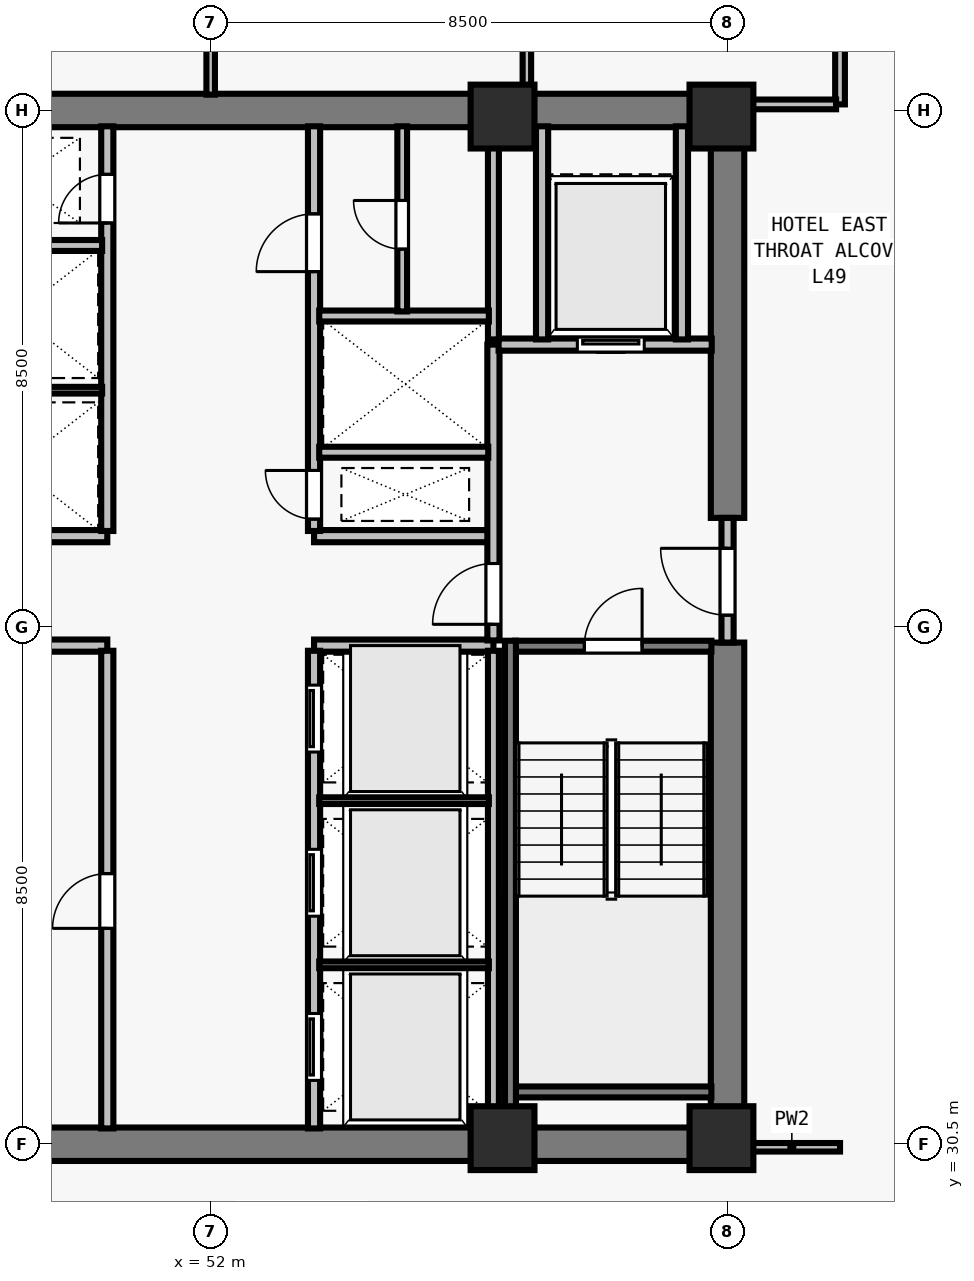
"""IFC4 building model, lengths in metres.
Left out: names, types, materials, properties, quantities, classifications, styles, units other than length and angle.
Written with IfcOpenShell. Run it as: python <this file> out.ifc"""

import sys

from ifc_helpers import new_model, si_unit, direction, frame, frame_2d, origin, origin_2d, place, context, subcontext, project, spatial, rectangle, extrude, element, fill, save


model = new_model("IFC4")
c1 = context("Model", 3, precision=1e-05, world=origin(), true_north=direction((0.0, 1.0)))
c2 = subcontext(c1, "Body", "Model", "MODEL_VIEW")
j1 = project(units=[si_unit("LENGTHUNIT", "METRE"), si_unit("PLANEANGLEUNIT", "RADIAN")], contexts=[c1])
p1 = place(None, origin())
s1 = spatial("IfcSite", under=j1, at=p1, CompositionType="ELEMENT")
p2 = place(p1, origin())
s2 = spatial("IfcBuilding", under=s1, at=p2, CompositionType="ELEMENT")
p3 = place(p2, frame((0.0, 0.0, 179.5)))
s3 = spatial("IfcBuildingStorey", under=s2, at=p3, CompositionType="ELEMENT", Elevation=179.5)
for number, where, z_axis, x_axis in (
    (1, (56.8, 30.6, 0.0), (0.0, 0.0, 1.0), (1.0, 0.0, 0.0)),
    (2, (60.4, 30.6, 0.0), (0.0, 0.0, 1.0), (1.0, 0.0, 0.0)),
    (3, (56.8, 47.4, 0.0), (0.0, 0.0, 1.0), (1.0, 0.0, 0.0)),
    (4, (60.4, 47.4, 0.0), (0.0, 0.0, 1.0), (1.0, 0.0, 0.0)),
):
    element("IfcColumn", number, at=place(p3, frame(where, z_axis=z_axis, x_axis=x_axis)), inside=s3, PredefinedType="COLUMN", context=c2, shape_type="SweptSolid", body=[
        extrude(rectangle(XDim=1.05, YDim=1.05, at=origin_2d()), origin(), (0.0, 0.0, 1.0), 3.5),
    ])
for number, where, z_axis, x_axis in (
    (5, (43.225, 30.5, 0.0), (0.0, 0.0, 1.0), (1.0, 0.0, 0.0)),
    (6, (43.225, 47.5, 0.0), (0.0, 0.0, 1.0), (1.0, 0.0, 0.0)),
):
    element("IfcWall", number, at=place(p3, frame(where, z_axis=z_axis, x_axis=x_axis)), inside=s3, PredefinedType="SHEAR", context=c2, shape_type="SweptSolid", body=[
        extrude(rectangle(XDim=17.55, YDim=0.55, at=frame_2d((8.775, 0.0))), origin(), (0.0, 0.0, 1.0), 3.28),
    ])
p4 = place(p3, frame((60.5, 30.765, 0.0), z_axis=(0.0, 0.0, 1.0), x_axis=(0.0, 1.0, 0.0)))
e7 = element("IfcWall", 7, at=p4, inside=s3, PredefinedType="SHEAR", context=c2, shape_type="SweptSolid", body=[
    extrude(rectangle(XDim=7.985, YDim=0.55, at=frame_2d((3.993, 0.0))), origin(), (0.0, 0.0, 1.0), 3.28),
])
p5 = place(p3, frame((60.5, 40.8, 0.0), z_axis=(0.0, 0.0, 1.0), x_axis=(0.0, 1.0, 0.0)))
e8 = element("IfcWall", 8, at=p5, inside=s3, PredefinedType="SHEAR", context=c2, shape_type="SweptSolid", body=[
    extrude(rectangle(XDim=6.435, YDim=0.55, at=frame_2d((3.218, 0.0))), origin(), (0.0, 0.0, 1.0), 3.28),
])
for number, where, z_axis, x_axis in (
    (9, (47.35, 38.7, 0.0), (0.0, 0.0, 1.0), (1.0, 0.0, 0.0)),
    (10, (47.35, 40.5, 0.0), (0.0, 0.0, 1.0), (1.0, 0.0, 0.0)),
    (11, (53.7, 38.7, 0.0), (0.0, 0.0, 1.0), (1.0, 0.0, 0.0)),
    (12, (53.7, 40.5, 0.0), (0.0, 0.0, 1.0), (1.0, 0.0, 0.0)),
):
    element("IfcWall", number, at=place(p3, frame(where, z_axis=z_axis, x_axis=x_axis)), inside=s3, PredefinedType="SOLIDWALL", context=c2, shape_type="SweptSolid", body=[
        extrude(rectangle(XDim=2.95, YDim=0.2, at=frame_2d((1.475, 0.0))), origin(), (0.0, 0.0, 1.0), 3.28),
    ])
p6 = place(p3, frame((50.3, 30.76, 0.0), z_axis=(0.0, 0.0, 1.0), x_axis=(0.0, 1.0, 0.0)))
e13 = element("IfcWall", 13, at=p6, inside=s3, PredefinedType="SOLIDWALL", context=c2, shape_type="SweptSolid", body=[
    extrude(rectangle(XDim=7.855, YDim=0.2, at=frame_2d((3.927, 0.0))), origin(), (0.0, 0.0, 1.0), 3.28),
])
p7 = place(p6, frame((3.29, 0.0, 0.0)))
e14 = element("IfcOpeningElement", 14, at=p7, cuts=e13, PredefinedType="OPENING", context=c2, shape_type="SweptSolid", body=[
    extrude(rectangle(XDim=0.9, YDim=2.12, at=frame_2d((0.45, 1.06))), frame((0.0, 0.11, 0.0), z_axis=(0.0, -1.0, 0.0), x_axis=(1.0, 0.0, 0.0)), (0.0, 0.0, 1.0), 0.22),
])
p8 = place(p3, frame((53.7, 30.76, 0.0), z_axis=(0.0, 0.0, 1.0), x_axis=(0.0, 1.0, 0.0)))
e15 = element("IfcWall", 15, at=p8, inside=s3, PredefinedType="SOLIDWALL", context=c2, shape_type="SweptSolid", body=[
    extrude(rectangle(XDim=7.855, YDim=0.2, at=frame_2d((3.927, 0.0))), origin(), (0.0, 0.0, 1.0), 3.28),
])
p9 = place(p8, frame((0.79, 0.0, 0.0)))
e16 = element("IfcOpeningElement", 16, at=p9, cuts=e15, PredefinedType="OPENING", context=c2, shape_type="SweptSolid", body=[
    extrude(rectangle(XDim=1.1, YDim=2.2, at=frame_2d((0.55, 1.1))), frame((0.0, 0.11, 0.0), z_axis=(0.0, -1.0, 0.0), x_axis=(1.0, 0.0, 0.0)), (0.0, 0.0, 1.0), 0.22),
])
p10 = place(p8, frame((3.49, 0.0, 0.0)))
e17 = element("IfcOpeningElement", 17, at=p10, cuts=e15, PredefinedType="OPENING", context=c2, shape_type="SweptSolid", body=[
    extrude(rectangle(XDim=1.1, YDim=2.2, at=frame_2d((0.55, 1.1))), frame((0.0, 0.11, 0.0), z_axis=(0.0, -1.0, 0.0), x_axis=(1.0, 0.0, 0.0)), (0.0, 0.0, 1.0), 0.22),
])
p11 = place(p8, frame((6.19, 0.0, 0.0)))
e18 = element("IfcOpeningElement", 18, at=p11, cuts=e15, PredefinedType="OPENING", context=c2, shape_type="SweptSolid", body=[
    extrude(rectangle(XDim=1.1, YDim=2.2, at=frame_2d((0.55, 1.1))), frame((0.0, 0.11, 0.0), z_axis=(0.0, -1.0, 0.0), x_axis=(1.0, 0.0, 0.0)), (0.0, 0.0, 1.0), 0.22),
])
p12 = place(p3, frame((50.3, 40.585, 0.0), z_axis=(0.0, 0.0, 1.0), x_axis=(0.0, 1.0, 0.0)))
e19 = element("IfcWall", 19, at=p12, inside=s3, PredefinedType="SOLIDWALL", context=c2, shape_type="SweptSolid", body=[
    extrude(rectangle(XDim=6.655, YDim=0.2, at=frame_2d((3.328, 0.0))), origin(), (0.0, 0.0, 1.0), 3.28),
])
p13 = place(p12, frame((5.065, 0.0, 0.0)))
e20 = element("IfcOpeningElement", 20, at=p13, cuts=e19, PredefinedType="OPENING", context=c2, shape_type="SweptSolid", body=[
    extrude(rectangle(XDim=0.8, YDim=2.08, at=frame_2d((0.4, 1.04))), frame((0.0, 0.11, 0.0), z_axis=(0.0, -1.0, 0.0), x_axis=(1.0, 0.0, 0.0)), (0.0, 0.0, 1.0), 0.22),
])
p14 = place(p3, frame((53.7, 40.585, 0.0), z_axis=(0.0, 0.0, 1.0), x_axis=(0.0, 1.0, 0.0)))
e21 = element("IfcWall", 21, at=p14, inside=s3, PredefinedType="SOLIDWALL", context=c2, shape_type="SweptSolid", body=[
    extrude(rectangle(XDim=6.655, YDim=0.2, at=frame_2d((3.328, 0.0))), origin(), (0.0, 0.0, 1.0), 3.28),
])
p15 = place(p14, frame((0.195, 0.0, 0.0)))
e22 = element("IfcOpeningElement", 22, at=p15, cuts=e21, PredefinedType="OPENING", context=c2, shape_type="SweptSolid", body=[
    extrude(rectangle(XDim=0.8, YDim=2.08, at=frame_2d((0.4, 1.04))), frame((0.0, 0.11, 0.0), z_axis=(0.0, -1.0, 0.0), x_axis=(1.0, 0.0, 0.0)), (0.0, 0.0, 1.0), 0.22),
])
p16 = place(p14, frame((4.265, 0.0, 0.0)))
e23 = element("IfcOpeningElement", 23, at=p16, cuts=e21, PredefinedType="OPENING", context=c2, shape_type="SweptSolid", body=[
    extrude(rectangle(XDim=0.95, YDim=2.12, at=frame_2d((0.475, 1.06))), frame((0.0, 0.11, 0.0), z_axis=(0.0, -1.0, 0.0), x_axis=(1.0, 0.0, 0.0)), (0.0, 0.0, 1.0), 0.22),
])
p17 = place(p3, frame((60.5, 38.75, 0.0), z_axis=(0.0, 0.0, 1.0), x_axis=(0.0, 1.0, 0.0)))
e24 = element("IfcWall", 24, at=p17, inside=s3, PredefinedType="SOLIDWALL", context=c2, shape_type="SweptSolid", body=[
    extrude(rectangle(XDim=2.05, YDim=0.2, at=frame_2d((1.025, 0.0))), origin(), (0.0, 0.0, 1.0), 3.28),
])
p18 = place(p17, frame((0.45, 0.0, 0.0)))
e25 = element("IfcOpeningElement", 25, at=p18, cuts=e24, PredefinedType="OPENING", context=c2, shape_type="SweptSolid", body=[
    extrude(rectangle(XDim=1.1, YDim=2.15, at=frame_2d((0.55, 1.075))), frame((0.0, 0.11, 0.0), z_axis=(0.0, -1.0, 0.0), x_axis=(1.0, 0.0, 0.0)), (0.0, 0.0, 1.0), 0.22),
])
p19 = place(p3, frame((56.65, 38.785, 0.0), z_axis=(0.0, 0.0, 1.0), x_axis=(0.0, 1.0, 0.0)))
e26 = element("IfcWall", 26, at=p19, inside=s3, PredefinedType="SOLIDWALL", context=c2, shape_type="SweptSolid", body=[
    extrude(rectangle(XDim=4.865, YDim=0.2, at=frame_2d((2.433, 0.0))), origin(), (0.0, 0.0, 1.0), 3.28),
])
p20 = place(p19, frame((0.265, 0.0, 0.0)))
e27 = element("IfcOpeningElement", 27, at=p20, cuts=e26, PredefinedType="OPENING", context=c2, shape_type="SweptSolid", body=[
    extrude(rectangle(XDim=1.0, YDim=2.15, at=frame_2d((0.5, 1.075))), frame((0.0, 0.11, 0.0), z_axis=(0.0, -1.0, 0.0), x_axis=(1.0, 0.0, 0.0)), (0.0, 0.0, 1.0), 0.22),
])
p21 = place(p3, frame((56.735, 43.65, 0.0), z_axis=(0.0, 0.0, 1.0), x_axis=(1.0, 0.0, 0.0)))
e28 = element("IfcWall", 28, at=p21, inside=s3, PredefinedType="SOLIDWALL", context=c2, shape_type="SweptSolid", body=[
    extrude(rectangle(XDim=3.505, YDim=0.2, at=frame_2d((1.752, 0.0))), origin(), (0.0, 0.0, 1.0), 3.28),
])
p22 = place(p21, frame((1.295, 0.0, 0.0)))
e29 = element("IfcOpeningElement", 29, at=p22, cuts=e28, PredefinedType="OPENING", context=c2, shape_type="SweptSolid", body=[
    extrude(rectangle(XDim=1.1, YDim=2.2, at=frame_2d((0.55, 1.1))), frame((0.0, 0.11, 0.0), z_axis=(0.0, -1.0, 0.0), x_axis=(1.0, 0.0, 0.0)), (0.0, 0.0, 1.0), 0.22),
])
for number, where, z_axis, x_axis in (
    (30, (57.45, 43.735, 0.0), (0.0, 0.0, 1.0), (0.0, 1.0, 0.0)),
    (31, (59.75, 43.735, 0.0), (0.0, 0.0, 1.0), (0.0, 1.0, 0.0)),
):
    element("IfcWall", number, at=place(p3, frame(where, z_axis=z_axis, x_axis=x_axis)), inside=s3, PredefinedType="SOLIDWALL", context=c2, shape_type="SweptSolid", body=[
        extrude(rectangle(XDim=3.505, YDim=0.2, at=frame_2d((1.752, 0.0))), origin(), (0.0, 0.0, 1.0), 3.28),
    ])
p23 = place(p3, frame((56.65, 30.76, 0.0), z_axis=(0.0, 0.0, 1.0), x_axis=(0.0, 1.0, 0.0)))
e32 = element("IfcWall", 32, at=p23, inside=s3, PredefinedType="SOLIDWALL", context=c2, shape_type="SweptSolid", body=[
    extrude(rectangle(XDim=7.855, YDim=0.18, at=frame_2d((3.927, 0.0))), origin(), (0.0, 0.0, 1.0), 3.28),
])
for number, where, z_axis, x_axis in (
    (33, (53.785, 33.45, 0.0), (0.0, 0.0, 1.0), (1.0, 0.0, 0.0)),
    (34, (53.785, 36.15, 0.0), (0.0, 0.0, 1.0), (1.0, 0.0, 0.0)),
):
    element("IfcWall", number, at=place(p3, frame(where, z_axis=z_axis, x_axis=x_axis)), inside=s3, PredefinedType="PARTITIONING", context=c2, shape_type="SweptSolid", body=[
        extrude(rectangle(XDim=2.79, YDim=0.11, at=frame_2d((1.395, 0.0))), origin(), (0.0, 0.0, 1.0), 3.28),
    ])
p24 = place(p3, frame((47.435, 42.9, 0.0), z_axis=(0.0, 0.0, 1.0), x_axis=(1.0, 0.0, 0.0)))
e35 = element("IfcWall", 35, at=p24, inside=s3, PredefinedType="PARTITIONING", context=c2, shape_type="SweptSolid", body=[
    extrude(rectangle(XDim=2.78, YDim=0.11, at=frame_2d((1.39, 0.0))), origin(), (0.0, 0.0, 1.0), 3.28),
])
p25 = place(p3, frame((47.425, 45.28, 0.0), z_axis=(0.0, 0.0, 1.0), x_axis=(1.0, 0.0, 0.0)))
e36 = element("IfcWall", 36, at=p25, inside=s3, PredefinedType="SOLIDWALL", context=c2, shape_type="SweptSolid", body=[
    extrude(rectangle(XDim=2.79, YDim=0.18, at=frame_2d((1.395, 0.0))), origin(), (0.0, 0.0, 1.0), 3.28),
])
p26 = place(p3, frame((56.65, 43.735, 0.0), z_axis=(0.0, 0.0, 1.0), x_axis=(0.0, 1.0, 0.0)))
e37 = element("IfcWall", 37, at=p26, inside=s3, PredefinedType="SOLIDWALL", context=c2, shape_type="SweptSolid", body=[
    extrude(rectangle(XDim=3.505, YDim=0.18, at=frame_2d((1.752, 0.0))), origin(), (0.0, 0.0, 1.0), 3.28),
])
p27 = place(p3, frame((53.785, 41.88, 0.0), z_axis=(0.0, 0.0, 1.0), x_axis=(1.0, 0.0, 0.0)))
e38 = element("IfcWall", 38, at=p27, inside=s3, PredefinedType="SOLIDWALL", context=c2, shape_type="SweptSolid", body=[
    extrude(rectangle(XDim=2.78, YDim=0.18, at=frame_2d((1.39, 0.0))), origin(), (0.0, 0.0, 1.0), 3.28),
])
p28 = place(p3, frame((53.785, 44.12, 0.0), z_axis=(0.0, 0.0, 1.0), x_axis=(1.0, 0.0, 0.0)))
e39 = element("IfcWall", 39, at=p28, inside=s3, PredefinedType="SOLIDWALL", context=c2, shape_type="SweptSolid", body=[
    extrude(rectangle(XDim=2.79, YDim=0.18, at=frame_2d((1.395, 0.0))), origin(), (0.0, 0.0, 1.0), 3.28),
])
p29 = place(p3, frame((55.15, 44.195, 0.0), z_axis=(0.0, 0.0, 1.0), x_axis=(0.0, 1.0, 0.0)))
e40 = element("IfcWall", 40, at=p29, inside=s3, PredefinedType="PARTITIONING", context=c2, shape_type="SweptSolid", body=[
    extrude(rectangle(XDim=3.045, YDim=0.16, at=frame_2d((1.522, 0.0))), origin(), (0.0, 0.0, 1.0), 3.28),
])
p30 = place(p29, frame((1.025, 0.0, 0.0)))
e41 = element("IfcOpeningElement", 41, at=p30, cuts=e40, PredefinedType="OPENING", context=c2, shape_type="SweptSolid", body=[
    extrude(rectangle(XDim=0.8, YDim=2.1, at=frame_2d((0.4, 1.05))), frame((0.0, 0.09, 0.0), z_axis=(0.0, -1.0, 0.0), x_axis=(1.0, 0.0, 0.0)), (0.0, 0.0, 1.0), 0.18),
])
p31 = place(p3, frame((62.35, 47.6, 0.0), z_axis=(0.0, 0.0, 1.0), x_axis=(0.0, 1.0, 0.0)))
e42 = element("IfcWall", 42, at=p31, inside=s3, PredefinedType="PARTITIONING", context=c2, shape_type="SweptSolid", body=[
    extrude(rectangle(XDim=15.075, YDim=0.16, at=frame_2d((7.538, 0.0))), origin(), (0.0, 0.0, 1.0), 2.555),
])
p32 = place(p31, frame((3.2, 0.0, 0.0)))
e43 = element("IfcOpeningElement", 43, at=p32, cuts=e42, PredefinedType="OPENING", context=c2, shape_type="SweptSolid", body=[
    extrude(rectangle(XDim=0.92, YDim=2.12, at=frame_2d((0.46, 1.06))), frame((0.0, 0.09, 0.0), z_axis=(0.0, -1.0, 0.0), x_axis=(1.0, 0.0, 0.0)), (0.0, 0.0, 1.0), 0.18),
])
p33 = place(p3, frame((60.765, 30.45, 0.0), z_axis=(0.0, 0.0, 1.0), x_axis=(1.0, 0.0, 0.0)))
e44 = element("IfcWall", 44, at=p33, inside=s3, PredefinedType="PARTITIONING", context=c2, shape_type="SweptSolid", body=[
    extrude(rectangle(XDim=1.585, YDim=0.14, at=frame_2d((0.792, 0.0))), origin(), (0.0, 0.0, 1.0), 3.28),
])
p34 = place(p3, frame((60.765, 47.6, 0.0), z_axis=(0.0, 0.0, 1.0), x_axis=(1.0, 0.0, 0.0)))
e45 = element("IfcWall", 45, at=p34, inside=s3, PredefinedType="PARTITIONING", context=c2, shape_type="SweptSolid", body=[
    extrude(rectangle(XDim=1.52, YDim=0.16, at=frame_2d((0.76, 0.0))), origin(), (0.0, 0.0, 1.0), 3.28),
])
p35 = place(p3, frame((52.0, 47.76, 0.0), z_axis=(0.0, 0.0, 1.0), x_axis=(0.0, 1.0, 0.0)))
e46 = element("IfcWall", 46, at=p35, inside=s3, PredefinedType="PARTITIONING", context=c2, shape_type="SweptSolid", body=[
    extrude(rectangle(XDim=14.915, YDim=0.14, at=frame_2d((7.458, 0.0))), origin(), (0.0, 0.0, 1.0), 2.896),
])
p36 = place(p35, frame((2.34, 0.0, 0.0)))
e47 = element("IfcOpeningElement", 47, at=p36, cuts=e46, PredefinedType="OPENING", context=c2, shape_type="SweptSolid", body=[
    extrude(rectangle(XDim=0.92, YDim=2.12, at=frame_2d((0.46, 1.06))), frame((0.0, 0.08, 0.0), z_axis=(0.0, -1.0, 0.0), x_axis=(1.0, 0.0, 0.0)), (0.0, 0.0, 1.0), 0.16),
])
p37 = place(p3, frame((57.2, 47.76, 0.0), z_axis=(0.0, 0.0, 1.0), x_axis=(0.0, 1.0, 0.0)))
e48 = element("IfcWall", 48, at=p37, inside=s3, PredefinedType="PARTITIONING", context=c2, shape_type="SweptSolid", body=[
    extrude(rectangle(XDim=14.915, YDim=0.14, at=frame_2d((7.458, 0.0))), origin(), (0.0, 0.0, 1.0), 3.28),
])
p38 = place(p3, frame((57.005, 38.69, 0.0), z_axis=(0.0, 0.0, 1.0), x_axis=(1.0, 0.0, 0.0)))
e49 = element("IfcWall", 49, at=p38, inside=s3, PredefinedType="SOLIDWALL", context=c2, shape_type="SweptSolid", body=[
    extrude(rectangle(XDim=3.23, YDim=0.18, at=frame_2d((1.615, 0.0))), origin(), (0.0, 0.0, 1.0), 3.28),
])
p39 = place(p38, frame((1.14, 0.0, 0.0)))
e50 = element("IfcOpeningElement", 50, at=p39, cuts=e49, PredefinedType="OPENING", context=c2, shape_type="SweptSolid", body=[
    extrude(rectangle(XDim=0.95, YDim=2.15, at=frame_2d((0.475, 1.075))), frame((0.0, 0.1, 0.0), z_axis=(0.0, -1.0, 0.0), x_axis=(1.0, 0.0, 0.0)), (0.0, 0.0, 1.0), 0.2),
])
p40 = place(p3, frame((57.005, 31.36, 0.0), z_axis=(0.0, 0.0, 1.0), x_axis=(1.0, 0.0, 0.0)))
e51 = element("IfcWall", 51, at=p40, inside=s3, PredefinedType="SOLIDWALL", context=c2, shape_type="SweptSolid", body=[
    extrude(rectangle(XDim=3.23, YDim=0.18, at=frame_2d((1.615, 0.0))), origin(), (0.0, 0.0, 1.0), 3.28),
])
p41 = place(p3, frame((56.93, 38.78, 0.0), z_axis=(0.0, 0.0, 1.0), x_axis=(0.0, -1.0, 0.0)))
e52 = element("IfcWall", 52, at=p41, inside=s3, PredefinedType="SOLIDWALL", context=c2, shape_type="SweptSolid", body=[
    extrude(rectangle(XDim=8.017, YDim=0.18, at=frame_2d((4.009, 0.0))), origin(), (0.0, 0.0, 1.0), 3.28),
])
p42 = place(p18, origin())
e53 = element("IfcDoor", 53, at=p42, inside=s3, OperationType="SINGLE_SWING_RIGHT", PredefinedType="DOOR", context=c2, shape_type="SweptSolid", body=[
    extrude(rectangle(XDim=1.1, YDim=2.15, at=frame_2d((0.55, 1.075))), frame((0.0, 0.025, 0.0), z_axis=(0.0, -1.0, 0.0), x_axis=(1.0, 0.0, 0.0)), (0.0, 0.0, 1.0), 0.05),
])
fill(e25, e53)
p43 = place(p20, origin())
e54 = element("IfcDoor", 54, at=p43, inside=s3, OperationType="SINGLE_SWING_LEFT", PredefinedType="DOOR", context=c2, shape_type="SweptSolid", body=[
    extrude(rectangle(XDim=1.0, YDim=2.15, at=frame_2d((0.5, 1.075))), frame((0.0, 0.025, 0.0), z_axis=(0.0, -1.0, 0.0), x_axis=(1.0, 0.0, 0.0)), (0.0, 0.0, 1.0), 0.05),
])
fill(e27, e54)
p44 = place(p22, origin())
e55 = element("IfcDoor", 55, at=p44, inside=s3, OperationType="SLIDING_TO_LEFT", PredefinedType="DOOR", context=c2, shape_type="SweptSolid", body=[
    extrude(rectangle(XDim=1.1, YDim=2.2, at=frame_2d((0.55, 1.1))), frame((0.0, 0.025, 0.0), z_axis=(0.0, -1.0, 0.0), x_axis=(1.0, 0.0, 0.0)), (0.0, 0.0, 1.0), 0.05),
])
fill(e29, e55)
p45 = place(p7, origin())
e56 = element("IfcDoor", 56, at=p45, inside=s3, OperationType="SINGLE_SWING_LEFT", PredefinedType="DOOR", context=c2, shape_type="SweptSolid", body=[
    extrude(rectangle(XDim=0.9, YDim=2.12, at=frame_2d((0.45, 1.06))), frame((0.0, 0.025, 0.0), z_axis=(0.0, -1.0, 0.0), x_axis=(1.0, 0.0, 0.0)), (0.0, 0.0, 1.0), 0.05),
])
fill(e14, e56)
p46 = place(p9, origin())
e57 = element("IfcDoor", 57, at=p46, inside=s3, OperationType="SLIDING_TO_LEFT", PredefinedType="DOOR", context=c2, shape_type="SweptSolid", body=[
    extrude(rectangle(XDim=1.1, YDim=2.2, at=frame_2d((0.55, 1.1))), frame((0.0, 0.025, 0.0), z_axis=(0.0, -1.0, 0.0), x_axis=(1.0, 0.0, 0.0)), (0.0, 0.0, 1.0), 0.05),
])
fill(e16, e57)
p47 = place(p10, origin())
e58 = element("IfcDoor", 58, at=p47, inside=s3, OperationType="SLIDING_TO_LEFT", PredefinedType="DOOR", context=c2, shape_type="SweptSolid", body=[
    extrude(rectangle(XDim=1.1, YDim=2.2, at=frame_2d((0.55, 1.1))), frame((0.0, 0.025, 0.0), z_axis=(0.0, -1.0, 0.0), x_axis=(1.0, 0.0, 0.0)), (0.0, 0.0, 1.0), 0.05),
])
fill(e17, e58)
p48 = place(p11, origin())
e59 = element("IfcDoor", 59, at=p48, inside=s3, OperationType="SLIDING_TO_LEFT", PredefinedType="DOOR", context=c2, shape_type="SweptSolid", body=[
    extrude(rectangle(XDim=1.1, YDim=2.2, at=frame_2d((0.55, 1.1))), frame((0.0, 0.025, 0.0), z_axis=(0.0, -1.0, 0.0), x_axis=(1.0, 0.0, 0.0)), (0.0, 0.0, 1.0), 0.05),
])
fill(e18, e59)
p49 = place(p13, origin())
e60 = element("IfcDoor", 60, at=p49, inside=s3, OperationType="SINGLE_SWING_LEFT", PredefinedType="DOOR", context=c2, shape_type="SweptSolid", body=[
    extrude(rectangle(XDim=0.8, YDim=2.08, at=frame_2d((0.4, 1.04))), frame((0.0, 0.025, 0.0), z_axis=(0.0, -1.0, 0.0), x_axis=(1.0, 0.0, 0.0)), (0.0, 0.0, 1.0), 0.05),
])
fill(e20, e60)
p50 = place(p15, origin())
e61 = element("IfcDoor", 61, at=p50, inside=s3, OperationType="SINGLE_SWING_RIGHT", PredefinedType="DOOR", context=c2, shape_type="SweptSolid", body=[
    extrude(rectangle(XDim=0.8, YDim=2.08, at=frame_2d((0.4, 1.04))), frame((0.0, 0.025, 0.0), z_axis=(0.0, -1.0, 0.0), x_axis=(1.0, 0.0, 0.0)), (0.0, 0.0, 1.0), 0.05),
])
fill(e22, e61)
p51 = place(p16, origin())
e62 = element("IfcDoor", 62, at=p51, inside=s3, OperationType="SINGLE_SWING_LEFT", PredefinedType="DOOR", context=c2, shape_type="SweptSolid", body=[
    extrude(rectangle(XDim=0.95, YDim=2.12, at=frame_2d((0.475, 1.06))), frame((0.0, 0.025, 0.0), z_axis=(0.0, -1.0, 0.0), x_axis=(1.0, 0.0, 0.0)), (0.0, 0.0, 1.0), 0.05),
])
fill(e23, e62)
p52 = place(p30, origin())
e63 = element("IfcDoor", 63, at=p52, inside=s3, OperationType="SINGLE_SWING_RIGHT", PredefinedType="DOOR", context=c2, shape_type="SweptSolid", body=[
    extrude(rectangle(XDim=0.8, YDim=2.1, at=frame_2d((0.4, 1.05))), frame((0.0, 0.025, 0.0), z_axis=(0.0, -1.0, 0.0), x_axis=(1.0, 0.0, 0.0)), (0.0, 0.0, 1.0), 0.05),
])
fill(e41, e63)
p53 = place(p39, origin())
e64 = element("IfcDoor", 64, at=p53, inside=s3, OperationType="SINGLE_SWING_RIGHT", PredefinedType="DOOR", context=c2, shape_type="SweptSolid", body=[
    extrude(rectangle(XDim=0.95, YDim=2.15, at=frame_2d((0.475, 1.075))), frame((0.0, 0.025, 0.0), z_axis=(0.0, -1.0, 0.0), x_axis=(1.0, 0.0, 0.0)), (0.0, 0.0, 1.0), 0.05),
])
fill(e50, e64)
save(model, sys.argv[1])
